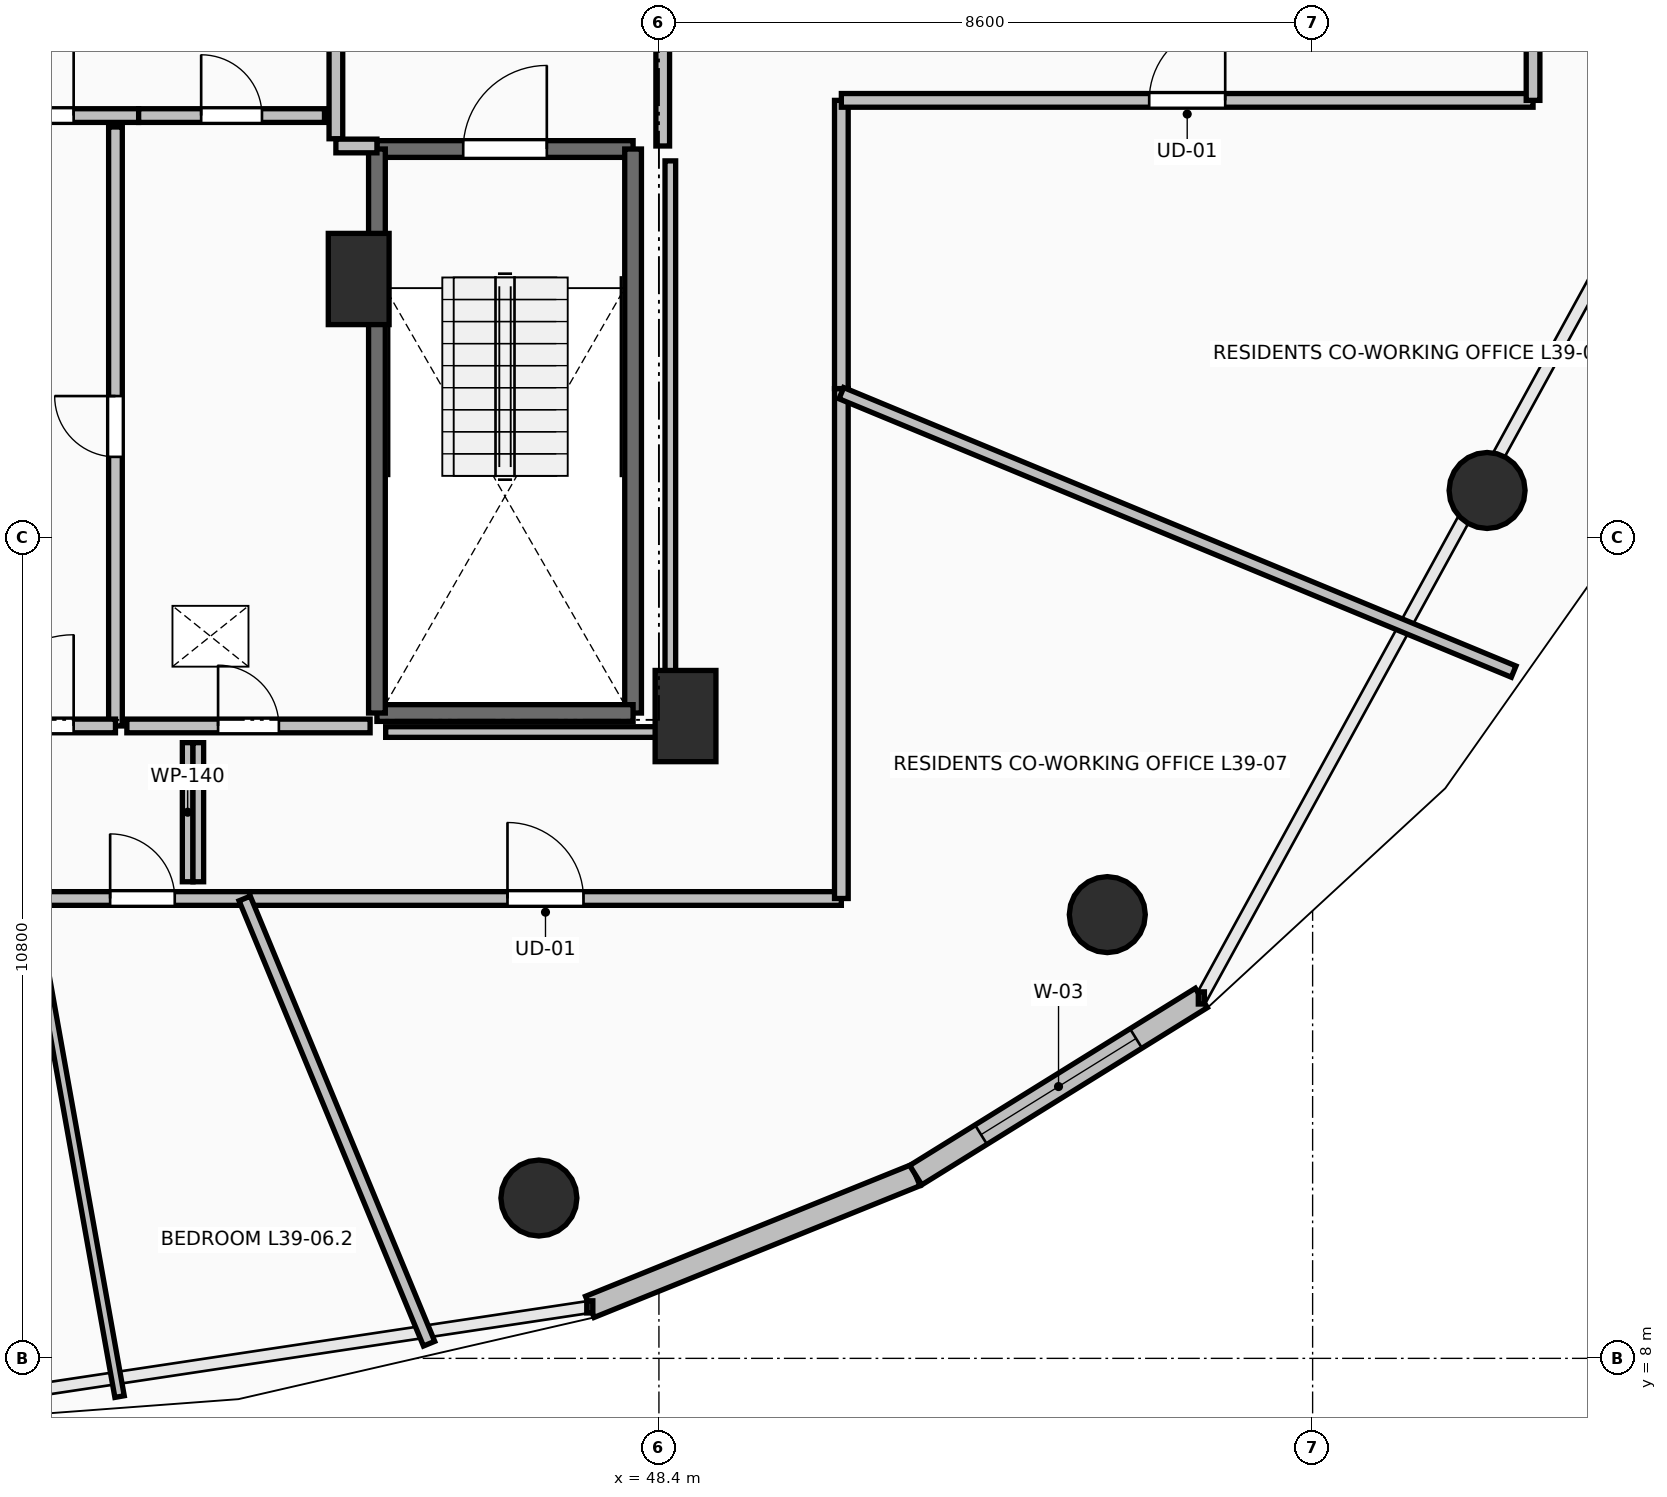
"""IFC4 building model, lengths in metres.
Left out: names, types, materials, properties, quantities, classifications, styles, units other than length and angle.
Written with IfcOpenShell. Run it as: python <this file> out.ifc"""

import sys

from ifc_helpers import new_model, si_unit, direction, frame, frame_2d, origin, origin_2d, place, context, subcontext, project, spatial, rectangle, circle, extrude, element, fill, save


model = new_model("IFC4")
c1 = context("Model", 3, precision=1e-05, world=origin(), true_north=direction((0.0, 1.0)))
c2 = subcontext(c1, "Body", "Model", "MODEL_VIEW")
j1 = project(units=[si_unit("LENGTHUNIT", "METRE"), si_unit("PLANEANGLEUNIT", "RADIAN")], contexts=[c1])
p1 = place(None, origin())
s1 = spatial("IfcSite", under=j1, at=p1, CompositionType="ELEMENT")
p2 = place(p1, origin())
s2 = spatial("IfcBuilding", under=s1, at=p2, CompositionType="ELEMENT")
p3 = place(p2, frame((0.0, 0.0, 146.6)))
s3 = spatial("IfcBuildingStorey", under=s2, at=p3, CompositionType="ELEMENT", Elevation=146.6)
for number, where, z_axis, x_axis in (
    (1, (46.821, 10.109, 0.0), (0.0, 0.0, 1.0), (0.383, -0.924, 0.0)),
    (2, (54.299, 13.838, 0.0), (0.0, 0.0, 1.0), (0.707, -0.707, 0.0)),
    (3, (59.295, 19.418, 0.0), (0.0, 0.0, 1.0), (0.924, -0.383, 0.0)),
):
    element("IfcColumn", number, at=place(p3, frame(where, z_axis=z_axis, x_axis=x_axis)), inside=s3, PredefinedType="COLUMN", context=c2, shape_type="SweptSolid", body=[
        extrude(circle(Radius=0.5, at=origin_2d()), origin(), (0.0, 0.0, 1.0), 3.5),
    ])
for number, where, z_axis, x_axis in (
    (4, (48.75, 16.45, 0.0), (0.0, 0.0, 1.0), (1.0, 0.0, 0.0)),
    (5, (44.45, 22.2, 0.0), (0.0, 0.0, 1.0), (1.0, 0.0, 0.0)),
):
    element("IfcColumn", number, at=place(p3, frame(where, z_axis=z_axis, x_axis=x_axis)), inside=s3, PredefinedType="PILASTER", context=c2, shape_type="SweptSolid", body=[
        extrude(rectangle(XDim=0.8, YDim=1.2, at=origin_2d()), origin(), (0.0, 0.0, 1.0), 3.5),
    ])
p4 = place(p3, frame((47.49, 8.677, 0.0), z_axis=(0.0, 0.0, 1.0), x_axis=(0.927156504392, 0.374674280359, 0.0)))
e6 = element("IfcWall", 6, at=p4, inside=s3, PredefinedType="STANDARD", context=c2, shape_type="SweptSolid", body=[
    extrude(rectangle(XDim=4.625, YDim=0.3, at=frame_2d((2.312, 0.0))), origin(), (0.0, 0.0, 1.0), 3.24),
])
p5 = place(p3, frame((51.778, 10.41, 0.0), z_axis=(0.0, 0.0, 1.0), x_axis=(0.849721181976, 0.527232313977, 0.0)))
e7 = element("IfcWall", 7, at=p5, inside=s3, PredefinedType="STANDARD", context=c2, shape_type="SweptSolid", body=[
    extrude(rectangle(XDim=4.423, YDim=0.3, at=frame_2d((2.211, 0.0))), origin(), (0.0, 0.0, 1.0), 3.24),
])
p6 = place(p5, frame((1.011, 0.0, 0.85)))
e8 = element("IfcOpeningElement", 8, at=p6, cuts=e7, PredefinedType="OPENING", context=c2, shape_type="SweptSolid", body=[
    extrude(rectangle(XDim=2.4, YDim=2.19, at=frame_2d((1.2, 1.095))), frame((0.0, 0.165, 0.0), z_axis=(0.0, -1.0, 0.0), x_axis=(1.0, 0.0, 0.0)), (0.0, 0.0, 1.0), 0.33),
])
p7 = place(p3, frame((44.69, 23.91, 0.0), z_axis=(0.0, 0.0, 1.0), x_axis=(1.0, 0.0, 0.0)))
e9 = element("IfcWall", 9, at=p7, inside=s3, PredefinedType="SOLIDWALL", context=c2, shape_type="SweptSolid", body=[
    extrude(rectangle(XDim=3.37, YDim=0.22, at=frame_2d((1.685, 0.0))), origin(), (0.0, 0.0, 1.0), 3.24),
])
p8 = place(p7, frame((1.135, 0.0, 0.0)))
e10 = element("IfcOpeningElement", 10, at=p8, cuts=e9, PredefinedType="OPENING", context=c2, shape_type="SweptSolid", body=[
    extrude(rectangle(XDim=1.1, YDim=2.15, at=frame_2d((0.55, 1.075))), frame((0.0, 0.125, 0.0), z_axis=(0.0, -1.0, 0.0), x_axis=(1.0, 0.0, 0.0)), (0.0, 0.0, 1.0), 0.25),
])
p9 = place(p3, frame((48.06, 23.91, 0.0), z_axis=(0.0, 0.0, 1.0), x_axis=(0.0, -1.0, 0.0)))
e11 = element("IfcWall", 11, at=p9, inside=s3, PredefinedType="SOLIDWALL", context=c2, shape_type="SweptSolid", body=[
    extrude(rectangle(XDim=7.42, YDim=0.22, at=frame_2d((3.71, 0.0))), origin(), (0.0, 0.0, 1.0), 3.24),
])
p10 = place(p3, frame((48.06, 16.49, 0.0), z_axis=(0.0, 0.0, 1.0), x_axis=(-1.0, 0.0, 0.0)))
e12 = element("IfcWall", 12, at=p10, inside=s3, PredefinedType="SOLIDWALL", context=c2, shape_type="SweptSolid", body=[
    extrude(rectangle(XDim=3.37, YDim=0.22, at=frame_2d((1.685, 0.0))), origin(), (0.0, 0.0, 1.0), 3.24),
])
p11 = place(p3, frame((44.69, 16.49, 0.0), z_axis=(0.0, 0.0, 1.0), x_axis=(0.0, 1.0, 0.0)))
e13 = element("IfcWall", 13, at=p11, inside=s3, PredefinedType="SOLIDWALL", context=c2, shape_type="SweptSolid", body=[
    extrude(rectangle(XDim=7.42, YDim=0.22, at=frame_2d((3.71, 0.0))), origin(), (0.0, 0.0, 1.0), 3.24),
])
p12 = place(p3, frame((44.15, 27.955, 0.0), z_axis=(0.0, 0.0, 1.0), x_axis=(0.0, -1.0, 0.0)))
e14 = element("IfcWall", 14, at=p12, inside=s3, PredefinedType="PARTITIONING", context=c2, shape_type="SweptSolid", body=[
    extrude(rectangle(XDim=3.91, YDim=0.18, at=frame_2d((1.955, 0.0))), origin(), (0.0, 0.0, 1.0), 3.24),
])
p13 = place(p12, frame((1.355, 0.0, 0.0)))
e15 = element("IfcOpeningElement", 15, at=p13, cuts=e14, PredefinedType="OPENING", context=c2, shape_type="SweptSolid", body=[
    extrude(rectangle(XDim=1.2, YDim=2.15, at=frame_2d((0.6, 1.075))), frame((0.0, 0.105, 0.0), z_axis=(0.0, -1.0, 0.0), x_axis=(1.0, 0.0, 0.0)), (0.0, 0.0, 1.0), 0.21),
])
p14 = place(p3, frame((44.15, 23.95, 0.0), z_axis=(0.0, 0.0, 1.0), x_axis=(1.0, 0.0, 0.0)))
e16 = element("IfcWall", 16, at=p14, inside=s3, PredefinedType="PARTITIONING", context=c2, shape_type="SweptSolid", body=[
    extrude(rectangle(XDim=0.54, YDim=0.18, at=frame_2d((0.27, 0.0))), origin(), (0.0, 0.0, 1.0), 3.24),
])
p15 = place(p3, frame((48.45, 23.95, 0.0), z_axis=(0.0, 0.0, 1.0), x_axis=(0.0, 1.0, 0.0)))
e17 = element("IfcWall", 17, at=p15, inside=s3, PredefinedType="PARTITIONING", context=c2, shape_type="SweptSolid", body=[
    extrude(rectangle(XDim=4.05, YDim=0.18, at=frame_2d((2.025, 0.0))), origin(), (0.0, 0.0, 1.0), 3.24),
])
p16 = place(p15, frame((1.425, 0.0, 0.0)))
e18 = element("IfcOpeningElement", 18, at=p16, cuts=e17, PredefinedType="OPENING", context=c2, shape_type="SweptSolid", body=[
    extrude(rectangle(XDim=1.2, YDim=2.15, at=frame_2d((0.6, 1.075))), frame((0.0, 0.105, 0.0), z_axis=(0.0, -1.0, 0.0), x_axis=(1.0, 0.0, 0.0)), (0.0, 0.0, 1.0), 0.21),
])
p17 = place(p3, frame((38.645, 24.35, 0.0), z_axis=(0.0, 0.0, 1.0), x_axis=(1.0, 0.0, 0.0)))
e19 = element("IfcWall", 19, at=p17, inside=s3, PredefinedType="PARTITIONING", context=c2, shape_type="SweptSolid", body=[
    extrude(rectangle(XDim=2.91, YDim=0.18, at=frame_2d((1.455, 0.0))), origin(), (0.0, 0.0, 1.0), 3.24),
])
p18 = place(p17, frame((0.855, 0.0, 0.0)))
e20 = element("IfcOpeningElement", 20, at=p18, cuts=e19, PredefinedType="OPENING", context=c2, shape_type="SweptSolid", body=[
    extrude(rectangle(XDim=1.2, YDim=2.15, at=frame_2d((0.6, 1.075))), frame((0.0, 0.105, 0.0), z_axis=(0.0, -1.0, 0.0), x_axis=(1.0, 0.0, 0.0)), (0.0, 0.0, 1.0), 0.21),
])
p19 = place(p3, frame((41.555, 24.35, 0.0), z_axis=(0.0, 0.0, 1.0), x_axis=(1.0, 0.0, 0.0)))
e21 = element("IfcWall", 21, at=p19, inside=s3, PredefinedType="PARTITIONING", context=c2, shape_type="SweptSolid", body=[
    extrude(rectangle(XDim=2.445, YDim=0.18, at=frame_2d((1.223, 0.0))), origin(), (0.0, 0.0, 1.0), 3.24),
])
p20 = place(p19, frame((0.823, 0.0, 0.0)))
e22 = element("IfcOpeningElement", 22, at=p20, cuts=e21, PredefinedType="OPENING", context=c2, shape_type="SweptSolid", body=[
    extrude(rectangle(XDim=0.8, YDim=2.05, at=frame_2d((0.4, 1.025))), frame((0.0, 0.105, 0.0), z_axis=(0.0, -1.0, 0.0), x_axis=(1.0, 0.0, 0.0)), (0.0, 0.0, 1.0), 0.21),
])
p21 = place(p3, frame((41.25, 16.32, 0.0), z_axis=(0.0, 0.0, 1.0), x_axis=(0.0, 1.0, 0.0)))
e23 = element("IfcWall", 23, at=p21, inside=s3, PredefinedType="PARTITIONING", context=c2, shape_type="SweptSolid", body=[
    extrude(rectangle(XDim=7.88, YDim=0.18, at=frame_2d((3.94, 0.0))), origin(), (0.0, 0.0, 1.0), 3.24),
])
p22 = place(p21, frame((3.54, 0.0, 0.0)))
e24 = element("IfcOpeningElement", 24, at=p22, cuts=e23, PredefinedType="OPENING", context=c2, shape_type="SweptSolid", body=[
    extrude(rectangle(XDim=0.8, YDim=2.05, at=frame_2d((0.4, 1.025))), frame((0.0, 0.105, 0.0), z_axis=(0.0, -1.0, 0.0), x_axis=(1.0, 0.0, 0.0)), (0.0, 0.0, 1.0), 0.21),
])
p23 = place(p3, frame((38.95, 16.32, 0.0), z_axis=(0.0, 0.0, 1.0), x_axis=(1.0, 0.0, 0.0)))
e25 = element("IfcWall", 25, at=p23, inside=s3, PredefinedType="PARTITIONING", context=c2, shape_type="SweptSolid", body=[
    extrude(rectangle(XDim=2.3, YDim=0.18, at=frame_2d((1.15, 0.0))), origin(), (0.0, 0.0, 1.0), 3.24),
])
p24 = place(p23, frame((0.55, 0.0, 0.0)))
e26 = element("IfcOpeningElement", 26, at=p24, cuts=e25, PredefinedType="OPENING", context=c2, shape_type="SweptSolid", body=[
    extrude(rectangle(XDim=1.2, YDim=2.15, at=frame_2d((0.6, 1.075))), frame((0.0, 0.105, 0.0), z_axis=(0.0, -1.0, 0.0), x_axis=(1.0, 0.0, 0.0)), (0.0, 0.0, 1.0), 0.21),
])
p25 = place(p3, frame((41.4, 16.32, 0.0), z_axis=(0.0, 0.0, 1.0), x_axis=(1.0, 0.0, 0.0)))
e27 = element("IfcWall", 27, at=p25, inside=s3, PredefinedType="PARTITIONING", context=c2, shape_type="SweptSolid", body=[
    extrude(rectangle(XDim=3.2, YDim=0.18, at=frame_2d((1.6, 0.0))), origin(), (0.0, 0.0, 1.0), 3.24),
])
p26 = place(p25, frame((1.2, 0.0, 0.0)))
e28 = element("IfcOpeningElement", 28, at=p26, cuts=e27, PredefinedType="OPENING", context=c2, shape_type="SweptSolid", body=[
    extrude(rectangle(XDim=0.8, YDim=2.05, at=frame_2d((0.4, 1.025))), frame((0.0, 0.105, 0.0), z_axis=(0.0, -1.0, 0.0), x_axis=(1.0, 0.0, 0.0)), (0.0, 0.0, 1.0), 0.21),
])
p27 = place(p3, frame((40.195, 14.05, 0.0), z_axis=(0.0, 0.0, 1.0), x_axis=(1.0, 0.0, 0.0)))
e29 = element("IfcWall", 29, at=p27, inside=s3, PredefinedType="PARTITIONING", context=c2, shape_type="SweptSolid", body=[
    extrude(rectangle(XDim=2.82, YDim=0.18, at=frame_2d((1.41, 0.0))), origin(), (0.0, 0.0, 1.0), 2.972),
])
p28 = place(p27, frame((0.985, 0.0, 0.0)))
e30 = element("IfcOpeningElement", 30, at=p28, cuts=e29, PredefinedType="OPENING", context=c2, shape_type="SweptSolid", body=[
    extrude(rectangle(XDim=0.85, YDim=2.1, at=frame_2d((0.425, 1.05))), frame((0.0, 0.105, 0.0), z_axis=(0.0, -1.0, 0.0), x_axis=(1.0, 0.0, 0.0)), (0.0, 0.0, 1.0), 0.21),
])
p29 = place(p3, frame((43.015, 14.05, 0.0), z_axis=(0.0, 0.0, 1.0), x_axis=(1.0, 0.0, 0.0)))
e31 = element("IfcWall", 31, at=p29, inside=s3, PredefinedType="PARTITIONING", context=c2, shape_type="SweptSolid", body=[
    extrude(rectangle(XDim=7.785, YDim=0.18, at=frame_2d((3.893, 0.0))), origin(), (0.0, 0.0, 1.0), 2.432),
])
p30 = place(p29, frame((3.393, 0.0, 0.0)))
e32 = element("IfcOpeningElement", 32, at=p30, cuts=e31, PredefinedType="OPENING", context=c2, shape_type="SweptSolid", body=[
    extrude(rectangle(XDim=1.0, YDim=2.15, at=frame_2d((0.5, 1.075))), frame((0.0, 0.105, 0.0), z_axis=(0.0, -1.0, 0.0), x_axis=(1.0, 0.0, 0.0)), (0.0, 0.0, 1.0), 0.21),
])
p31 = place(p3, frame((50.8, 14.05, 0.0), z_axis=(0.0, 0.0, 1.0), x_axis=(0.0, 1.0, 0.0)))
e33 = element("IfcWall", 33, at=p31, inside=s3, PredefinedType="PARTITIONING", context=c2, shape_type="SweptSolid", body=[
    extrude(rectangle(XDim=6.708, YDim=0.18, at=frame_2d((3.354, 0.0))), origin(), (0.0, 0.0, 1.0), 2.432),
])
p32 = place(p3, frame((50.8, 20.758, 0.0), z_axis=(0.0, 0.0, 1.0), x_axis=(0.0, 1.0, 0.0)))
e34 = element("IfcWall", 34, at=p32, inside=s3, PredefinedType="PARTITIONING", context=c2, shape_type="SweptSolid", body=[
    extrude(rectangle(XDim=3.792, YDim=0.18, at=frame_2d((1.896, 0.0))), origin(), (0.0, 0.0, 1.0), 3.24),
])
p33 = place(p3, frame((50.8, 24.55, 0.0), z_axis=(0.0, 0.0, 1.0), x_axis=(1.0, 0.0, 0.0)))
e35 = element("IfcWall", 35, at=p33, inside=s3, PredefinedType="PARTITIONING", context=c2, shape_type="SweptSolid", body=[
    extrude(rectangle(XDim=9.1, YDim=0.18, at=frame_2d((4.55, 0.0))), origin(), (0.0, 0.0, 1.0), 2.432),
])
p34 = place(p33, frame((4.05, 0.0, 0.0)))
e36 = element("IfcOpeningElement", 36, at=p34, cuts=e35, PredefinedType="OPENING", context=c2, shape_type="SweptSolid", body=[
    extrude(rectangle(XDim=1.0, YDim=2.15, at=frame_2d((0.5, 1.075))), frame((0.0, 0.105, 0.0), z_axis=(0.0, -1.0, 0.0), x_axis=(1.0, 0.0, 0.0)), (0.0, 0.0, 1.0), 0.21),
])
p35 = place(p3, frame((59.9, 24.55, 0.0), z_axis=(0.0, 0.0, 1.0), x_axis=(0.0, 1.0, 0.0)))
e37 = element("IfcWall", 37, at=p35, inside=s3, PredefinedType="PARTITIONING", context=c2, shape_type="SweptSolid", body=[
    extrude(rectangle(XDim=2.7, YDim=0.18, at=frame_2d((1.35, 0.0))), origin(), (0.0, 0.0, 1.0), 2.432),
])
p36 = place(p3, frame((41.304, 7.497, 0.0), z_axis=(0.0, 0.0, 1.0), x_axis=(-0.175753825846, 0.984434148484, 0.0)))
e38 = element("IfcWall", 38, at=p36, inside=s3, PredefinedType="PARTITIONING", context=c2, shape_type="SweptSolid", body=[
    extrude(rectangle(XDim=6.656, YDim=0.125, at=frame_2d((3.328, 0.0))), origin(), (0.0, 0.0, 1.0), 2.432),
])
p37 = place(p3, frame((45.376, 8.193, 0.0), z_axis=(0.0, 0.0, 1.0), x_axis=(-0.382683979298, 0.923879305964, 0.0)))
e39 = element("IfcWall", 39, at=p37, inside=s3, PredefinedType="PARTITIONING", context=c2, shape_type="SweptSolid", body=[
    extrude(rectangle(XDim=6.34, YDim=0.16, at=frame_2d((3.17, 0.0))), origin(), (0.0, 0.0, 1.0), 2.432),
])
p38 = place(p3, frame((59.645, 17.035, 0.0), z_axis=(0.0, 0.0, 1.0), x_axis=(-0.923902460479, 0.382628074665, 0.0)))
e40 = element("IfcWall", 40, at=p38, inside=s3, PredefinedType="PARTITIONING", context=c2, shape_type="SweptSolid", body=[
    extrude(rectangle(XDim=9.573, YDim=0.16, at=frame_2d((4.787, 0.0))), origin(), (0.0, 0.0, 1.0), 2.728),
])
p39 = place(p3, frame((48.55, 16.24, 0.0), z_axis=(0.0, 0.0, 1.0), x_axis=(0.0, 1.0, 0.0)))
e41 = element("IfcWall", 41, at=p39, inside=s3, PredefinedType="PARTITIONING", context=c2, shape_type="SweptSolid", body=[
    extrude(rectangle(XDim=7.514, YDim=0.14, at=frame_2d((3.757, 0.0))), origin(), (0.0, 0.0, 1.0), 2.432),
])
for number, where, z_axis, x_axis in (
    (42, (42.2, 16.1, 0.0), (0.0, 0.0, 1.0), (0.0, -1.0, 0.0)),
    (43, (42.34, 14.27, 0.0), (0.0, 0.0, 1.0), (0.0, 1.0, 0.0)),
):
    element("IfcWall", number, at=place(p3, frame(where, z_axis=z_axis, x_axis=x_axis)), inside=s3, PredefinedType="PARTITIONING", context=c2, shape_type="SweptSolid", body=[
        extrude(rectangle(XDim=1.83, YDim=0.14, at=frame_2d((0.915, 0.0))), origin(), (0.0, 0.0, 1.0), 3.24),
    ])
p40 = place(p3, frame((44.805, 16.24, 0.0), z_axis=(0.0, 0.0, 1.0), x_axis=(1.0, 0.0, 0.0)))
e44 = element("IfcWall", 44, at=p40, inside=s3, PredefinedType="PARTITIONING", context=c2, shape_type="SweptSolid", body=[
    extrude(rectangle(XDim=3.745, YDim=0.14, at=frame_2d((1.873, 0.0))), origin(), (0.0, 0.0, 1.0), 2.432),
])
p41 = place(p6, origin())
e45 = element("IfcWindow", 45, at=p41, inside=s3, PartitioningType="SINGLE_PANEL", PredefinedType="WINDOW", context=c2, shape_type="SweptSolid", body=[
    extrude(rectangle(XDim=2.4, YDim=2.19, at=frame_2d((1.2, 1.095))), frame((0.0, 0.03, 0.0), z_axis=(0.0, -1.0, 0.0), x_axis=(1.0, 0.0, 0.0)), (0.0, 0.0, 1.0), 0.06),
])
fill(e8, e45)
p42 = place(p8, origin())
e46 = element("IfcDoor", 46, at=p42, inside=s3, OperationType="SINGLE_SWING_RIGHT", PredefinedType="DOOR", context=c2, shape_type="SweptSolid", body=[
    extrude(rectangle(XDim=1.1, YDim=2.15, at=frame_2d((0.55, 1.075))), frame((0.0, 0.025, 0.0), z_axis=(0.0, -1.0, 0.0), x_axis=(1.0, 0.0, 0.0)), (0.0, 0.0, 1.0), 0.05),
])
fill(e10, e46)
p43 = place(p18, origin())
e47 = element("IfcDoor", 47, at=p43, inside=s3, OperationType="SINGLE_SWING_RIGHT", PredefinedType="DOOR", context=c2, shape_type="SweptSolid", body=[
    extrude(rectangle(XDim=1.2, YDim=2.15, at=frame_2d((0.6, 1.075))), frame((0.0, 0.025, 0.0), z_axis=(0.0, -1.0, 0.0), x_axis=(1.0, 0.0, 0.0)), (0.0, 0.0, 1.0), 0.05),
])
fill(e20, e47)
p44 = place(p20, origin())
e48 = element("IfcDoor", 48, at=p44, inside=s3, OperationType="SINGLE_SWING_LEFT", PredefinedType="DOOR", context=c2, shape_type="SweptSolid", body=[
    extrude(rectangle(XDim=0.8, YDim=2.05, at=frame_2d((0.4, 1.025))), frame((0.0, 0.025, 0.0), z_axis=(0.0, -1.0, 0.0), x_axis=(1.0, 0.0, 0.0)), (0.0, 0.0, 1.0), 0.05),
])
fill(e22, e48)
p45 = place(p22, origin())
e49 = element("IfcDoor", 49, at=p45, inside=s3, OperationType="SINGLE_SWING_RIGHT", PredefinedType="DOOR", context=c2, shape_type="SweptSolid", body=[
    extrude(rectangle(XDim=0.8, YDim=2.05, at=frame_2d((0.4, 1.025))), frame((0.0, 0.025, 0.0), z_axis=(0.0, -1.0, 0.0), x_axis=(1.0, 0.0, 0.0)), (0.0, 0.0, 1.0), 0.05),
])
fill(e24, e49)
p46 = place(p24, origin())
e50 = element("IfcDoor", 50, at=p46, inside=s3, OperationType="SINGLE_SWING_RIGHT", PredefinedType="DOOR", context=c2, shape_type="SweptSolid", body=[
    extrude(rectangle(XDim=1.2, YDim=2.15, at=frame_2d((0.6, 1.075))), frame((0.0, 0.025, 0.0), z_axis=(0.0, -1.0, 0.0), x_axis=(1.0, 0.0, 0.0)), (0.0, 0.0, 1.0), 0.05),
])
fill(e26, e50)
p47 = place(p26, origin())
e51 = element("IfcDoor", 51, at=p47, inside=s3, OperationType="SINGLE_SWING_LEFT", PredefinedType="DOOR", context=c2, shape_type="SweptSolid", body=[
    extrude(rectangle(XDim=0.8, YDim=2.05, at=frame_2d((0.4, 1.025))), frame((0.0, 0.025, 0.0), z_axis=(0.0, -1.0, 0.0), x_axis=(1.0, 0.0, 0.0)), (0.0, 0.0, 1.0), 0.05),
])
fill(e28, e51)
p48 = place(p30, origin())
e52 = element("IfcDoor", 52, at=p48, inside=s3, OperationType="SINGLE_SWING_LEFT", PredefinedType="DOOR", context=c2, shape_type="SweptSolid", body=[
    extrude(rectangle(XDim=1.0, YDim=2.15, at=frame_2d((0.5, 1.075))), frame((0.0, 0.025, 0.0), z_axis=(0.0, -1.0, 0.0), x_axis=(1.0, 0.0, 0.0)), (0.0, 0.0, 1.0), 0.05),
])
fill(e32, e52)
p49 = place(p34, origin())
e53 = element("IfcDoor", 53, at=p49, inside=s3, OperationType="SINGLE_SWING_RIGHT", PredefinedType="DOOR", context=c2, shape_type="SweptSolid", body=[
    extrude(rectangle(XDim=1.0, YDim=2.15, at=frame_2d((0.5, 1.075))), frame((0.0, 0.025, 0.0), z_axis=(0.0, -1.0, 0.0), x_axis=(1.0, 0.0, 0.0)), (0.0, 0.0, 1.0), 0.05),
])
fill(e36, e53)
p50 = place(p28, origin())
e54 = element("IfcDoor", 54, at=p50, inside=s3, OperationType="SINGLE_SWING_LEFT", PredefinedType="DOOR", context=c2, shape_type="SweptSolid", body=[
    extrude(rectangle(XDim=0.85, YDim=2.1, at=frame_2d((0.425, 1.05))), frame((0.0, 0.025, 0.0), z_axis=(0.0, -1.0, 0.0), x_axis=(1.0, 0.0, 0.0)), (0.0, 0.0, 1.0), 0.05),
])
fill(e30, e54)
save(model, sys.argv[1])
